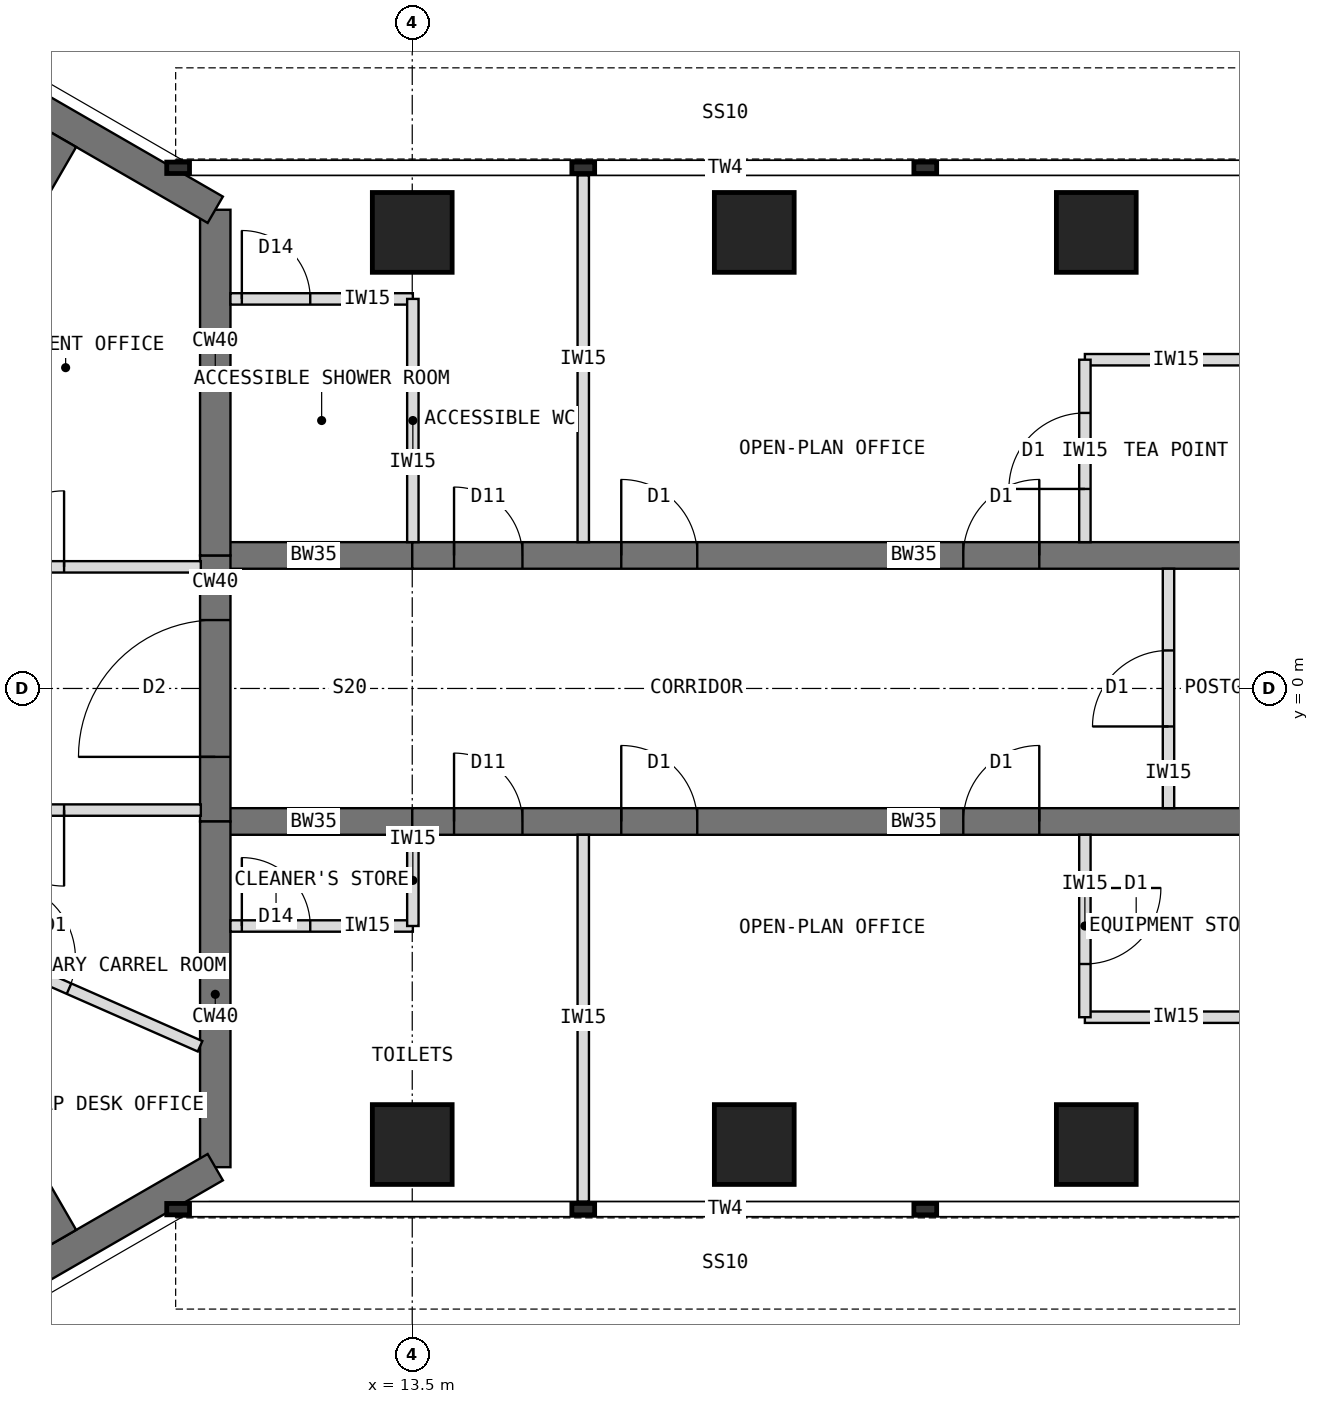
"""IFC4 building model, lengths in metres.
Left out: names, types, materials, properties, quantities, classifications, styles, units other than length and angle.
Written with IfcOpenShell. Run it as: python <this file> out.ifc"""

import sys

from ifc_helpers import new_model, si_unit, direction, frame, frame_2d, origin, origin_2d, place, context, subcontext, project, spatial, rectangle, extrude, element, fill, save


model = new_model("IFC4")
c1 = context("Model", 3, precision=1e-05, world=origin(), true_north=direction((0.0, 1.0)))
c2 = subcontext(c1, "Body", "Model", "MODEL_VIEW")
j1 = project(units=[si_unit("LENGTHUNIT", "METRE"), si_unit("PLANEANGLEUNIT", "RADIAN")], contexts=[c1])
p1 = place(None, origin())
s1 = spatial("IfcSite", under=j1, at=p1, CompositionType="ELEMENT")
p2 = place(p1, origin())
s2 = spatial("IfcBuilding", under=s1, at=p2, CompositionType="ELEMENT")
p3 = place(p2, frame((0.0, 0.0, 255.5)))
s3 = spatial("IfcBuildingStorey", under=s2, at=p3, CompositionType="ELEMENT", Elevation=255.5)
p4 = place(p3, frame((10.908, -6.298, 0.0), z_axis=(0.0, 0.0, 1.0), x_axis=(0.0, 1.0, 0.0)))
e1 = element("IfcWall", 1, at=p4, inside=s3, PredefinedType="SHEAR", context=c2, shape_type="SweptSolid", body=[
    extrude(rectangle(XDim=4.548, YDim=0.4, at=frame_2d((2.274, 0.0))), origin(), (0.0, 0.0, 1.0), 4.0),
])
p5 = place(p3, frame((10.908, -1.75, 0.0), z_axis=(0.0, 0.0, 1.0), x_axis=(0.0, 1.0, 0.0)))
e2 = element("IfcWall", 2, at=p5, inside=s3, PredefinedType="SHEAR", context=c2, shape_type="SweptSolid", body=[
    extrude(rectangle(XDim=3.5, YDim=0.4, at=frame_2d((1.75, 0.0))), origin(), (0.0, 0.0, 1.0), 4.0),
])
p6 = place(p5, frame((0.85, 0.0, 0.0)))
e3 = element("IfcOpeningElement", 3, at=p6, cuts=e2, PredefinedType="OPENING", context=c2, shape_type="SweptSolid", body=[
    extrude(rectangle(XDim=1.8, YDim=2.1, at=frame_2d((0.9, 1.05))), frame((0.0, 0.21, 0.0), z_axis=(0.0, -1.0, 0.0), x_axis=(1.0, 0.0, 0.0)), (0.0, 0.0, 1.0), 0.42),
])
p7 = place(p3, frame((10.908, 1.75, 0.0), z_axis=(0.0, 0.0, 1.0), x_axis=(0.0, 1.0, 0.0)))
e4 = element("IfcWall", 4, at=p7, inside=s3, PredefinedType="SHEAR", context=c2, shape_type="SweptSolid", body=[
    extrude(rectangle(XDim=4.548, YDim=0.4, at=frame_2d((2.274, 0.0))), origin(), (0.0, 0.0, 1.0), 4.0),
])
for number, where, z_axis, x_axis in (
    (5, (10.908, 6.298, 0.0), (0.0, 0.0, 1.0), (-0.866, 0.5, 0.0)),
    (6, (0.0, -12.596, 0.0), (0.0, 0.0, 1.0), (0.866, 0.5, 0.0)),
):
    element("IfcWall", number, at=place(p3, frame(where, z_axis=z_axis, x_axis=x_axis)), inside=s3, PredefinedType="SHEAR", context=c2, shape_type="SweptSolid", body=[
        extrude(rectangle(XDim=12.596, YDim=0.4, at=frame_2d((6.298, 0.0))), origin(), (0.0, 0.0, 1.0), 4.0),
    ])
p8 = place(p3, frame((10.908, 1.75, 0.0), z_axis=(0.0, 0.0, 1.0), x_axis=(1.0, 0.0, 0.0)))
e7 = element("IfcWall", 7, at=p8, inside=s3, PredefinedType="SHEAR", context=c2, shape_type="SweptSolid", body=[
    extrude(rectangle(XDim=2.592, YDim=0.35, at=frame_2d((1.296, 0.0))), origin(), (0.0, 0.0, 1.0), 4.0),
])
p9 = place(p3, frame((13.5, 1.75, 0.0), z_axis=(0.0, 0.0, 1.0), x_axis=(1.0, 0.0, 0.0)))
e8 = element("IfcWall", 8, at=p9, inside=s3, PredefinedType="SHEAR", context=c2, shape_type="SweptSolid", body=[
    extrude(rectangle(XDim=13.2, YDim=0.35, at=frame_2d((6.6, 0.0))), origin(), (0.0, 0.0, 1.0), 4.0),
])
p10 = place(p9, frame((0.55, 0.0, 0.0)))
e9 = element("IfcOpeningElement", 9, at=p10, cuts=e8, PredefinedType="OPENING", context=c2, shape_type="SweptSolid", body=[
    extrude(rectangle(XDim=0.9, YDim=2.1, at=frame_2d((0.45, 1.05))), frame((0.0, 0.185, 0.0), z_axis=(0.0, -1.0, 0.0), x_axis=(1.0, 0.0, 0.0)), (0.0, 0.0, 1.0), 0.37),
])
p11 = place(p9, frame((2.75, 0.0, 0.0)))
e10 = element("IfcOpeningElement", 10, at=p11, cuts=e8, PredefinedType="OPENING", context=c2, shape_type="SweptSolid", body=[
    extrude(rectangle(XDim=1.0, YDim=2.1, at=frame_2d((0.5, 1.05))), frame((0.0, 0.185, 0.0), z_axis=(0.0, -1.0, 0.0), x_axis=(1.0, 0.0, 0.0)), (0.0, 0.0, 1.0), 0.37),
])
p12 = place(p9, frame((7.25, 0.0, 0.0)))
e11 = element("IfcOpeningElement", 11, at=p12, cuts=e8, PredefinedType="OPENING", context=c2, shape_type="SweptSolid", body=[
    extrude(rectangle(XDim=1.0, YDim=2.1, at=frame_2d((0.5, 1.05))), frame((0.0, 0.185, 0.0), z_axis=(0.0, -1.0, 0.0), x_axis=(1.0, 0.0, 0.0)), (0.0, 0.0, 1.0), 0.37),
])
p13 = place(p3, frame((10.908, -1.75, 0.0), z_axis=(0.0, 0.0, 1.0), x_axis=(1.0, 0.0, 0.0)))
e12 = element("IfcWall", 12, at=p13, inside=s3, PredefinedType="SHEAR", context=c2, shape_type="SweptSolid", body=[
    extrude(rectangle(XDim=2.592, YDim=0.35, at=frame_2d((1.296, 0.0))), origin(), (0.0, 0.0, 1.0), 4.0),
])
p14 = place(p3, frame((13.5, -1.75, 0.0), z_axis=(0.0, 0.0, 1.0), x_axis=(1.0, 0.0, 0.0)))
e13 = element("IfcWall", 13, at=p14, inside=s3, PredefinedType="SHEAR", context=c2, shape_type="SweptSolid", body=[
    extrude(rectangle(XDim=13.2, YDim=0.35, at=frame_2d((6.6, 0.0))), origin(), (0.0, 0.0, 1.0), 4.0),
])
p15 = place(p14, frame((0.55, 0.0, 0.0)))
e14 = element("IfcOpeningElement", 14, at=p15, cuts=e13, PredefinedType="OPENING", context=c2, shape_type="SweptSolid", body=[
    extrude(rectangle(XDim=0.9, YDim=2.1, at=frame_2d((0.45, 1.05))), frame((0.0, 0.185, 0.0), z_axis=(0.0, -1.0, 0.0), x_axis=(1.0, 0.0, 0.0)), (0.0, 0.0, 1.0), 0.37),
])
p16 = place(p14, frame((2.75, 0.0, 0.0)))
e15 = element("IfcOpeningElement", 15, at=p16, cuts=e13, PredefinedType="OPENING", context=c2, shape_type="SweptSolid", body=[
    extrude(rectangle(XDim=1.0, YDim=2.1, at=frame_2d((0.5, 1.05))), frame((0.0, 0.185, 0.0), z_axis=(0.0, -1.0, 0.0), x_axis=(1.0, 0.0, 0.0)), (0.0, 0.0, 1.0), 0.37),
])
p17 = place(p14, frame((7.25, 0.0, 0.0)))
e16 = element("IfcOpeningElement", 16, at=p17, cuts=e13, PredefinedType="OPENING", context=c2, shape_type="SweptSolid", body=[
    extrude(rectangle(XDim=1.0, YDim=2.1, at=frame_2d((0.5, 1.05))), frame((0.0, 0.185, 0.0), z_axis=(0.0, -1.0, 0.0), x_axis=(1.0, 0.0, 0.0)), (0.0, 0.0, 1.0), 0.37),
])
for number, where, z_axis, x_axis in (
    (17, (13.5, 6.0, 0.0), (0.0, 0.0, 1.0), (1.0, 0.0, 0.0)),
    (18, (13.5, -6.0, 0.0), (0.0, 0.0, 1.0), (1.0, 0.0, 0.0)),
    (19, (18.0, 6.0, 0.0), (0.0, 0.0, 1.0), (1.0, 0.0, 0.0)),
    (20, (18.0, -6.0, 0.0), (0.0, 0.0, 1.0), (1.0, 0.0, 0.0)),
    (21, (22.5, 6.0, 0.0), (0.0, 0.0, 1.0), (1.0, 0.0, 0.0)),
    (22, (22.5, -6.0, 0.0), (0.0, 0.0, 1.0), (1.0, 0.0, 0.0)),
):
    element("IfcColumn", number, at=place(p3, frame(where, z_axis=z_axis, x_axis=x_axis)), inside=s3, PredefinedType="COLUMN", context=c2, shape_type="SweptSolid", body=[
        extrude(rectangle(XDim=1.05, YDim=1.05, at=origin_2d()), origin(), (0.0, 0.0, 1.0), 4.0),
    ])
for number, where, z_axis, x_axis in (
    (23, (5.901, 2.02, 0.0), (0.0, 0.0, 1.0), (0.5, 0.866, 0.0)),
    (24, (5.901, -2.02, 0.0), (0.0, 0.0, 1.0), (0.5, -0.866, 0.0)),
):
    element("IfcWall", number, at=place(p3, frame(where, z_axis=z_axis, x_axis=x_axis)), inside=s3, PredefinedType="SHEAR", context=c2, shape_type="SweptSolid", body=[
        extrude(rectangle(XDim=6.008, YDim=0.4, at=frame_2d((3.004, 0.0))), origin(), (0.0, 0.0, 1.0), 4.0),
    ])
p18 = place(p3, frame((15.75, 1.925, 0.0), z_axis=(0.0, 0.0, 1.0), x_axis=(0.0, 1.0, 0.0)))
e25 = element("IfcWall", 25, at=p18, inside=s3, PredefinedType="PARTITIONING", context=c2, shape_type="SweptSolid", body=[
    extrude(rectangle(XDim=4.825, YDim=0.15, at=frame_2d((2.413, 0.0))), origin(), (0.0, 0.0, 1.0), 3.8),
])
p19 = place(p3, frame((22.35, 4.325, 0.0), z_axis=(0.0, 0.0, 1.0), x_axis=(1.0, 0.0, 0.0)))
e26 = element("IfcWall", 26, at=p19, inside=s3, PredefinedType="PARTITIONING", context=c2, shape_type="SweptSolid", body=[
    extrude(rectangle(XDim=2.4, YDim=0.15, at=frame_2d((1.2, 0.0))), origin(), (0.0, 0.0, 1.0), 3.8),
])
p20 = place(p3, frame((22.35, 1.925, 0.0), z_axis=(0.0, 0.0, 1.0), x_axis=(0.0, 1.0, 0.0)))
e27 = element("IfcWall", 27, at=p20, inside=s3, PredefinedType="PARTITIONING", context=c2, shape_type="SweptSolid", body=[
    extrude(rectangle(XDim=2.4, YDim=0.15, at=frame_2d((1.2, 0.0))), origin(), (0.0, 0.0, 1.0), 3.8),
])
p21 = place(p20, frame((0.7, 0.0, 0.0)))
e28 = element("IfcOpeningElement", 28, at=p21, cuts=e27, PredefinedType="OPENING", context=c2, shape_type="SweptSolid", body=[
    extrude(rectangle(XDim=1.0, YDim=2.1, at=frame_2d((0.5, 1.05))), frame((0.0, 0.085, 0.0), z_axis=(0.0, -1.0, 0.0), x_axis=(1.0, 0.0, 0.0)), (0.0, 0.0, 1.0), 0.17),
])
p22 = place(p3, frame((11.108, 5.125, 0.0), z_axis=(0.0, 0.0, 1.0), x_axis=(1.0, 0.0, 0.0)))
e29 = element("IfcWall", 29, at=p22, inside=s3, PredefinedType="PARTITIONING", context=c2, shape_type="SweptSolid", body=[
    extrude(rectangle(XDim=2.4, YDim=0.15, at=frame_2d((1.2, 0.0))), origin(), (0.0, 0.0, 1.0), 3.8),
])
p23 = place(p22, frame((0.15, 0.0, 0.0)))
e30 = element("IfcOpeningElement", 30, at=p23, cuts=e29, PredefinedType="OPENING", context=c2, shape_type="SweptSolid", body=[
    extrude(rectangle(XDim=0.9, YDim=2.1, at=frame_2d((0.45, 1.05))), frame((0.0, 0.085, 0.0), z_axis=(0.0, -1.0, 0.0), x_axis=(1.0, 0.0, 0.0)), (0.0, 0.0, 1.0), 0.17),
])
p24 = place(p3, frame((13.508, 1.925, 0.0), z_axis=(0.0, 0.0, 1.0), x_axis=(0.0, 1.0, 0.0)))
e31 = element("IfcWall", 31, at=p24, inside=s3, PredefinedType="PARTITIONING", context=c2, shape_type="SweptSolid", body=[
    extrude(rectangle(XDim=3.2, YDim=0.15, at=frame_2d((1.6, 0.0))), origin(), (0.0, 0.0, 1.0), 3.267),
])
p25 = place(p3, frame((15.75, -1.925, 0.0), z_axis=(0.0, 0.0, 1.0), x_axis=(0.0, -1.0, 0.0)))
e32 = element("IfcWall", 32, at=p25, inside=s3, PredefinedType="PARTITIONING", context=c2, shape_type="SweptSolid", body=[
    extrude(rectangle(XDim=4.825, YDim=0.15, at=frame_2d((2.413, 0.0))), origin(), (0.0, 0.0, 1.0), 3.8),
])
p26 = place(p3, frame((22.35, -4.325, 0.0), z_axis=(0.0, 0.0, 1.0), x_axis=(1.0, 0.0, 0.0)))
e33 = element("IfcWall", 33, at=p26, inside=s3, PredefinedType="PARTITIONING", context=c2, shape_type="SweptSolid", body=[
    extrude(rectangle(XDim=2.4, YDim=0.15, at=frame_2d((1.2, 0.0))), origin(), (0.0, 0.0, 1.0), 3.8),
])
p27 = place(p3, frame((22.35, -1.925, 0.0), z_axis=(0.0, 0.0, 1.0), x_axis=(0.0, -1.0, 0.0)))
e34 = element("IfcWall", 34, at=p27, inside=s3, PredefinedType="PARTITIONING", context=c2, shape_type="SweptSolid", body=[
    extrude(rectangle(XDim=2.4, YDim=0.15, at=frame_2d((1.2, 0.0))), origin(), (0.0, 0.0, 1.0), 3.8),
])
p28 = place(p27, frame((0.7, 0.0, 0.0)))
e35 = element("IfcOpeningElement", 35, at=p28, cuts=e34, PredefinedType="OPENING", context=c2, shape_type="SweptSolid", body=[
    extrude(rectangle(XDim=1.0, YDim=2.1, at=frame_2d((0.5, 1.05))), frame((0.0, 0.085, 0.0), z_axis=(0.0, -1.0, 0.0), x_axis=(1.0, 0.0, 0.0)), (0.0, 0.0, 1.0), 0.17),
])
p29 = place(p3, frame((11.108, -3.125, 0.0), z_axis=(0.0, 0.0, 1.0), x_axis=(1.0, 0.0, 0.0)))
e36 = element("IfcWall", 36, at=p29, inside=s3, PredefinedType="PARTITIONING", context=c2, shape_type="SweptSolid", body=[
    extrude(rectangle(XDim=2.4, YDim=0.15, at=frame_2d((1.2, 0.0))), origin(), (0.0, 0.0, 1.0), 3.8),
])
p30 = place(p29, frame((0.15, 0.0, 0.0)))
e37 = element("IfcOpeningElement", 37, at=p30, cuts=e36, PredefinedType="OPENING", context=c2, shape_type="SweptSolid", body=[
    extrude(rectangle(XDim=0.9, YDim=2.1, at=frame_2d((0.45, 1.05))), frame((0.0, 0.085, 0.0), z_axis=(0.0, -1.0, 0.0), x_axis=(1.0, 0.0, 0.0)), (0.0, 0.0, 1.0), 0.17),
])
p31 = place(p3, frame((13.508, -1.925, 0.0), z_axis=(0.0, 0.0, 1.0), x_axis=(0.0, -1.0, 0.0)))
e38 = element("IfcWall", 38, at=p31, inside=s3, PredefinedType="PARTITIONING", context=c2, shape_type="SweptSolid", body=[
    extrude(rectangle(XDim=1.2, YDim=0.15, at=frame_2d((0.6, 0.0))), origin(), (0.0, 0.0, 1.0), 3.267),
])
p32 = place(p3, frame((6.1, 1.6, 0.0), z_axis=(0.0, 0.0, 1.0), x_axis=(1.0, 0.0, 0.0)))
e39 = element("IfcWall", 39, at=p32, inside=s3, PredefinedType="PARTITIONING", context=c2, shape_type="SweptSolid", body=[
    extrude(rectangle(XDim=4.618, YDim=0.15, at=frame_2d((2.309, 0.0))), origin(), (0.0, 0.0, 1.0), 3.8),
])
p33 = place(p32, frame((1.819, 0.0, 0.0)))
e40 = element("IfcOpeningElement", 40, at=p33, cuts=e39, PredefinedType="OPENING", context=c2, shape_type="SweptSolid", body=[
    extrude(rectangle(XDim=1.0, YDim=2.1, at=frame_2d((0.5, 1.05))), frame((0.0, 0.085, 0.0), z_axis=(0.0, -1.0, 0.0), x_axis=(1.0, 0.0, 0.0)), (0.0, 0.0, 1.0), 0.17),
])
p34 = place(p3, frame((10.718, -1.6, 0.0), z_axis=(0.0, 0.0, 1.0), x_axis=(-1.0, 0.0, 0.0)))
e41 = element("IfcWall", 41, at=p34, inside=s3, PredefinedType="PARTITIONING", context=c2, shape_type="SweptSolid", body=[
    extrude(rectangle(XDim=4.618, YDim=0.15, at=frame_2d((2.309, 0.0))), origin(), (0.0, 0.0, 1.0), 3.8),
])
p35 = place(p34, frame((1.799, 0.0, 0.0)))
e42 = element("IfcOpeningElement", 42, at=p35, cuts=e41, PredefinedType="OPENING", context=c2, shape_type="SweptSolid", body=[
    extrude(rectangle(XDim=1.0, YDim=2.1, at=frame_2d((0.5, 1.05))), frame((0.0, 0.085, 0.0), z_axis=(0.0, -1.0, 0.0), x_axis=(1.0, 0.0, 0.0)), (0.0, 0.0, 1.0), 0.17),
])
p36 = place(p3, frame((6.344, -2.789, 0.0), z_axis=(0.0, 0.0, 1.0), x_axis=(0.915438841787, -0.402457111937, 0.0)))
e43 = element("IfcWall", 43, at=p36, inside=s3, PredefinedType="PARTITIONING", context=c2, shape_type="SweptSolid", body=[
    extrude(rectangle(XDim=4.767, YDim=0.15, at=frame_2d((2.383, 0.0))), origin(), (0.0, 0.0, 1.0), 3.8),
])
p37 = place(p36, frame((1.883, 0.0, 0.0)))
e44 = element("IfcOpeningElement", 44, at=p37, cuts=e43, PredefinedType="OPENING", context=c2, shape_type="SweptSolid", body=[
    extrude(rectangle(XDim=1.0, YDim=2.1, at=frame_2d((0.5, 1.05))), frame((0.0, 0.085, 0.0), z_axis=(0.0, -1.0, 0.0), x_axis=(1.0, 0.0, 0.0)), (0.0, 0.0, 1.0), 0.17),
])
p38 = place(p3, frame((23.45, -1.575, 0.0), z_axis=(0.0, 0.0, 1.0), x_axis=(0.0, 1.0, 0.0)))
e45 = element("IfcWall", 45, at=p38, inside=s3, PredefinedType="PARTITIONING", context=c2, shape_type="SweptSolid", body=[
    extrude(rectangle(XDim=3.15, YDim=0.15, at=frame_2d((1.575, 0.0))), origin(), (0.0, 0.0, 1.0), 3.8),
])
p39 = place(p38, frame((1.075, 0.0, 0.0)))
e46 = element("IfcOpeningElement", 46, at=p39, cuts=e45, PredefinedType="OPENING", context=c2, shape_type="SweptSolid", body=[
    extrude(rectangle(XDim=1.0, YDim=2.1, at=frame_2d((0.5, 1.05))), frame((0.0, 0.085, 0.0), z_axis=(0.0, -1.0, 0.0), x_axis=(1.0, 0.0, 0.0)), (0.0, 0.0, 1.0), 0.17),
])
p40 = place(p6, origin())
e47 = element("IfcDoor", 47, at=p40, inside=s3, OperationType="DOUBLE_DOOR_DOUBLE_SWING", PredefinedType="DOOR", context=c2, shape_type="SweptSolid", body=[
    extrude(rectangle(XDim=1.8, YDim=2.1, at=frame_2d((0.9, 1.05))), frame((0.0, 0.025, 0.0), z_axis=(0.0, -1.0, 0.0), x_axis=(1.0, 0.0, 0.0)), (0.0, 0.0, 1.0), 0.05),
])
fill(e3, e47)
p41 = place(p21, origin())
e48 = element("IfcDoor", 48, at=p41, inside=s3, OperationType="SINGLE_SWING_LEFT", PredefinedType="DOOR", context=c2, shape_type="SweptSolid", body=[
    extrude(rectangle(XDim=1.0, YDim=2.1, at=frame_2d((0.5, 1.05))), frame((0.0, 0.025, 0.0), z_axis=(0.0, -1.0, 0.0), x_axis=(1.0, 0.0, 0.0)), (0.0, 0.0, 1.0), 0.05),
])
fill(e28, e48)
p42 = place(p23, origin())
e49 = element("IfcDoor", 49, at=p42, inside=s3, OperationType="SINGLE_SWING_LEFT", PredefinedType="DOOR", context=c2, shape_type="SweptSolid", body=[
    extrude(rectangle(XDim=0.9, YDim=2.1, at=frame_2d((0.45, 1.05))), frame((0.0, 0.025, 0.0), z_axis=(0.0, -1.0, 0.0), x_axis=(1.0, 0.0, 0.0)), (0.0, 0.0, 1.0), 0.05),
])
fill(e30, e49)
p43 = place(p28, origin())
e50 = element("IfcDoor", 50, at=p43, inside=s3, OperationType="SINGLE_SWING_LEFT", PredefinedType="DOOR", context=c2, shape_type="SweptSolid", body=[
    extrude(rectangle(XDim=1.0, YDim=2.1, at=frame_2d((0.5, 1.05))), frame((0.0, 0.025, 0.0), z_axis=(0.0, -1.0, 0.0), x_axis=(1.0, 0.0, 0.0)), (0.0, 0.0, 1.0), 0.05),
])
fill(e35, e50)
p44 = place(p30, origin())
e51 = element("IfcDoor", 51, at=p44, inside=s3, OperationType="SINGLE_SWING_LEFT", PredefinedType="DOOR", context=c2, shape_type="SweptSolid", body=[
    extrude(rectangle(XDim=0.9, YDim=2.1, at=frame_2d((0.45, 1.05))), frame((0.0, 0.025, 0.0), z_axis=(0.0, -1.0, 0.0), x_axis=(1.0, 0.0, 0.0)), (0.0, 0.0, 1.0), 0.05),
])
fill(e37, e51)
p45 = place(p35, origin())
e52 = element("IfcDoor", 52, at=p45, inside=s3, OperationType="SINGLE_SWING_LEFT", PredefinedType="DOOR", context=c2, shape_type="SweptSolid", body=[
    extrude(rectangle(XDim=1.0, YDim=2.1, at=frame_2d((0.5, 1.05))), frame((0.0, 0.025, 0.0), z_axis=(0.0, -1.0, 0.0), x_axis=(1.0, 0.0, 0.0)), (0.0, 0.0, 1.0), 0.05),
])
fill(e42, e52)
p46 = place(p37, origin())
e53 = element("IfcDoor", 53, at=p46, inside=s3, OperationType="SINGLE_SWING_LEFT", PredefinedType="DOOR", context=c2, shape_type="SweptSolid", body=[
    extrude(rectangle(XDim=1.0, YDim=2.1, at=frame_2d((0.5, 1.05))), frame((0.0, 0.025, 0.0), z_axis=(0.0, -1.0, 0.0), x_axis=(1.0, 0.0, 0.0)), (0.0, 0.0, 1.0), 0.05),
])
fill(e44, e53)
p47 = place(p33, origin())
e54 = element("IfcDoor", 54, at=p47, inside=s3, OperationType="SINGLE_SWING_RIGHT", PredefinedType="DOOR", context=c2, shape_type="SweptSolid", body=[
    extrude(rectangle(XDim=1.0, YDim=2.1, at=frame_2d((0.5, 1.05))), frame((0.0, 0.025, 0.0), z_axis=(0.0, -1.0, 0.0), x_axis=(1.0, 0.0, 0.0)), (0.0, 0.0, 1.0), 0.05),
])
fill(e40, e54)
p48 = place(p39, origin())
e55 = element("IfcDoor", 55, at=p48, inside=s3, OperationType="SINGLE_SWING_LEFT", PredefinedType="DOOR", context=c2, shape_type="SweptSolid", body=[
    extrude(rectangle(XDim=1.0, YDim=2.1, at=frame_2d((0.5, 1.05))), frame((0.0, 0.025, 0.0), z_axis=(0.0, -1.0, 0.0), x_axis=(1.0, 0.0, 0.0)), (0.0, 0.0, 1.0), 0.05),
])
fill(e46, e55)
p49 = place(p10, origin())
e56 = element("IfcDoor", 56, at=p49, inside=s3, OperationType="SINGLE_SWING_LEFT", PredefinedType="DOOR", context=c2, shape_type="SweptSolid", body=[
    extrude(rectangle(XDim=0.9, YDim=2.1, at=frame_2d((0.45, 1.05))), frame((0.0, 0.025, 0.0), z_axis=(0.0, -1.0, 0.0), x_axis=(1.0, 0.0, 0.0)), (0.0, 0.0, 1.0), 0.05),
])
fill(e9, e56)
p50 = place(p11, origin())
e57 = element("IfcDoor", 57, at=p50, inside=s3, OperationType="SINGLE_SWING_LEFT", PredefinedType="DOOR", context=c2, shape_type="SweptSolid", body=[
    extrude(rectangle(XDim=1.0, YDim=2.1, at=frame_2d((0.5, 1.05))), frame((0.0, 0.025, 0.0), z_axis=(0.0, -1.0, 0.0), x_axis=(1.0, 0.0, 0.0)), (0.0, 0.0, 1.0), 0.05),
])
fill(e10, e57)
p51 = place(p12, origin())
e58 = element("IfcDoor", 58, at=p51, inside=s3, OperationType="SINGLE_SWING_RIGHT", PredefinedType="DOOR", context=c2, shape_type="SweptSolid", body=[
    extrude(rectangle(XDim=1.0, YDim=2.1, at=frame_2d((0.5, 1.05))), frame((0.0, 0.025, 0.0), z_axis=(0.0, -1.0, 0.0), x_axis=(1.0, 0.0, 0.0)), (0.0, 0.0, 1.0), 0.05),
])
fill(e11, e58)
p52 = place(p15, origin())
e59 = element("IfcDoor", 59, at=p52, inside=s3, OperationType="SINGLE_SWING_LEFT", PredefinedType="DOOR", context=c2, shape_type="SweptSolid", body=[
    extrude(rectangle(XDim=0.9, YDim=2.1, at=frame_2d((0.45, 1.05))), frame((0.0, 0.025, 0.0), z_axis=(0.0, -1.0, 0.0), x_axis=(1.0, 0.0, 0.0)), (0.0, 0.0, 1.0), 0.05),
])
fill(e14, e59)
p53 = place(p16, origin())
e60 = element("IfcDoor", 60, at=p53, inside=s3, OperationType="SINGLE_SWING_LEFT", PredefinedType="DOOR", context=c2, shape_type="SweptSolid", body=[
    extrude(rectangle(XDim=1.0, YDim=2.1, at=frame_2d((0.5, 1.05))), frame((0.0, 0.025, 0.0), z_axis=(0.0, -1.0, 0.0), x_axis=(1.0, 0.0, 0.0)), (0.0, 0.0, 1.0), 0.05),
])
fill(e15, e60)
p54 = place(p17, origin())
e61 = element("IfcDoor", 61, at=p54, inside=s3, OperationType="SINGLE_SWING_RIGHT", PredefinedType="DOOR", context=c2, shape_type="SweptSolid", body=[
    extrude(rectangle(XDim=1.0, YDim=2.1, at=frame_2d((0.5, 1.05))), frame((0.0, 0.025, 0.0), z_axis=(0.0, -1.0, 0.0), x_axis=(1.0, 0.0, 0.0)), (0.0, 0.0, 1.0), 0.05),
])
fill(e16, e61)
save(model, sys.argv[1])
